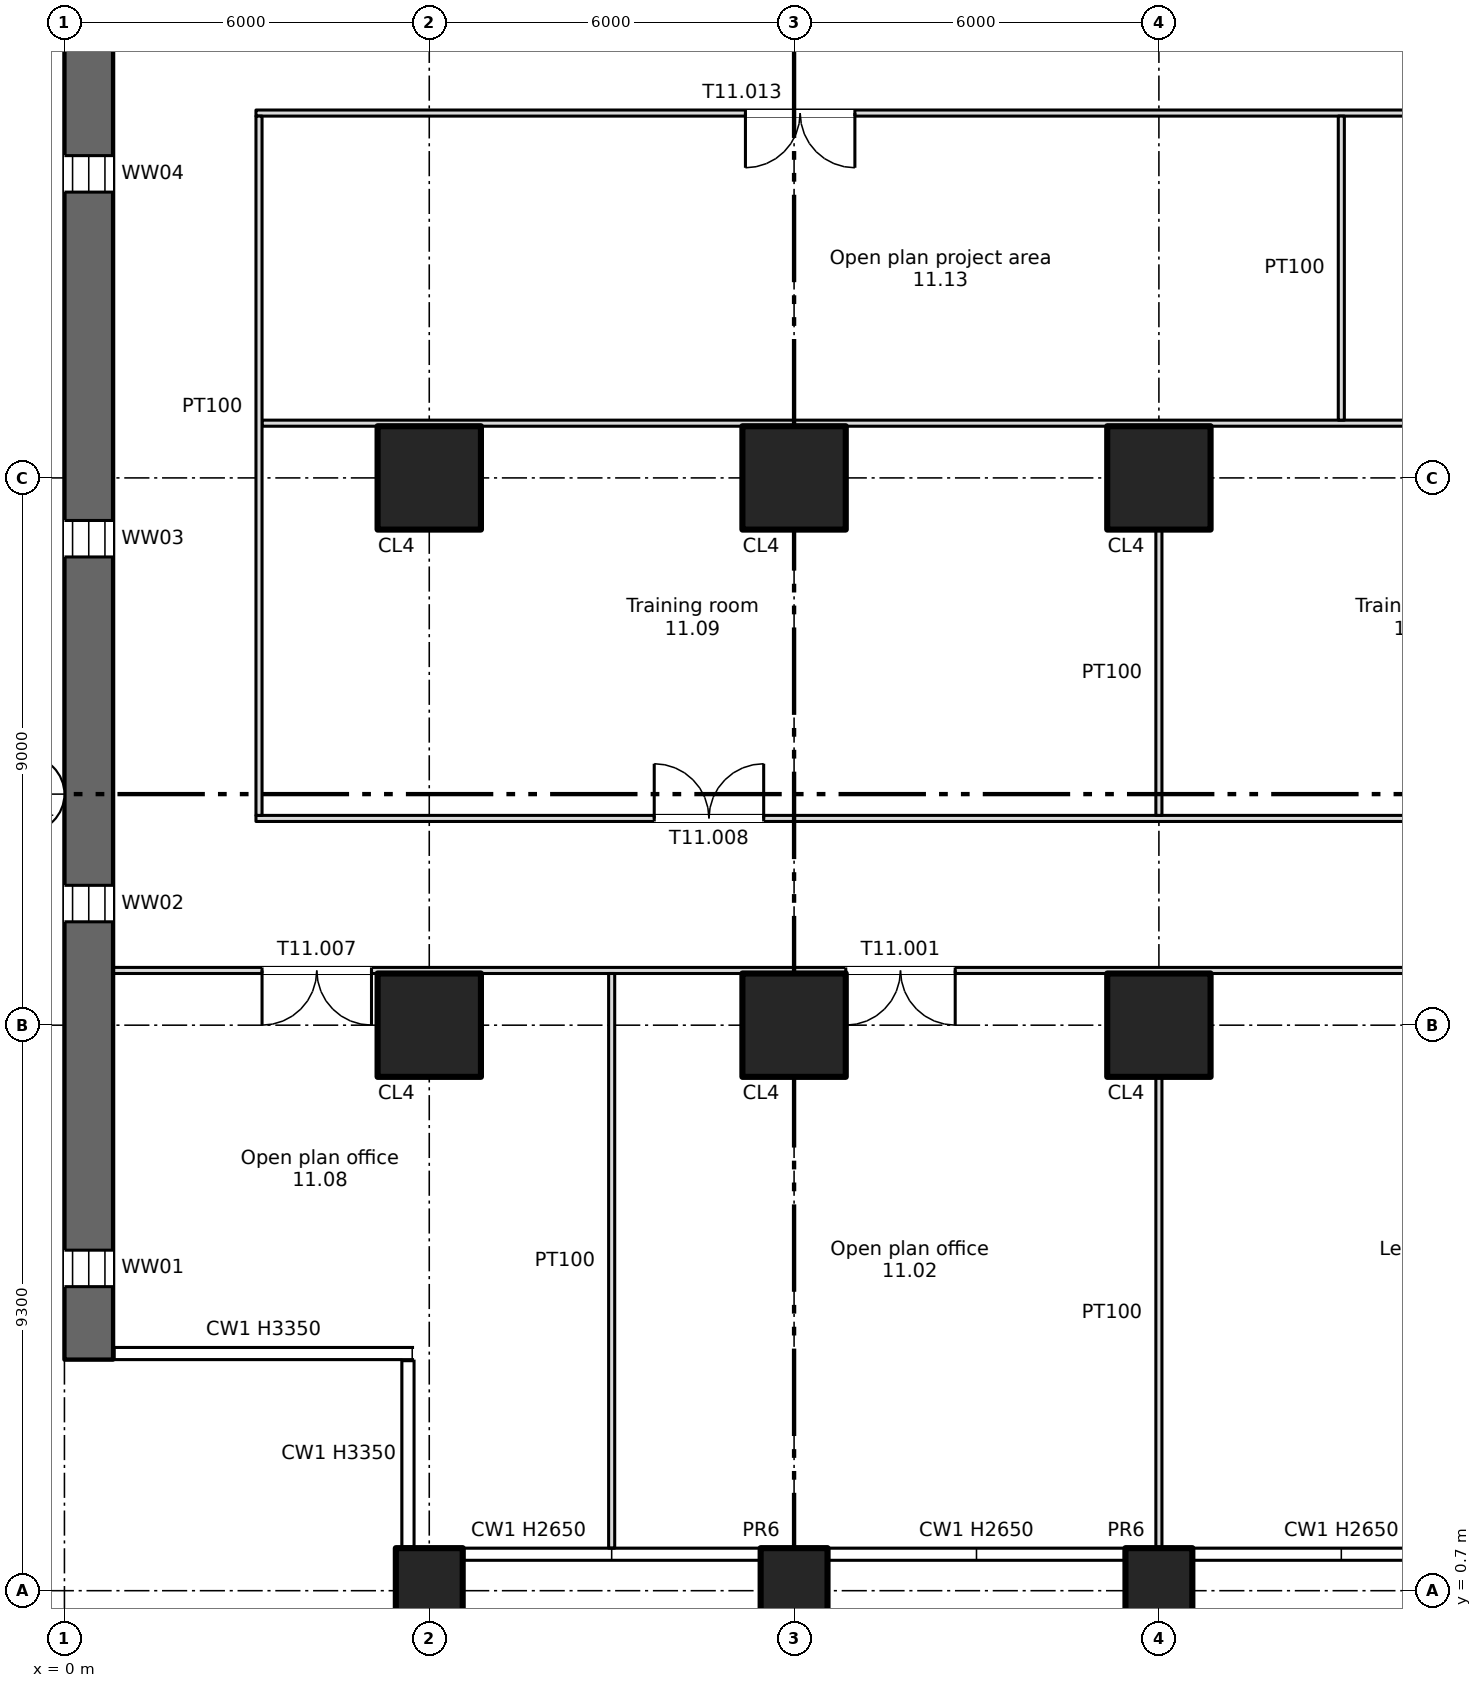
"""IFC4 building model, lengths in metres.
Left out: names, types, materials, properties, quantities, classifications, styles, units other than length and angle.
Written with IfcOpenShell. Run it as: python <this file> out.ifc"""

import sys

from ifc_helpers import new_model, si_unit, direction, frame, frame_2d, origin, origin_2d, place, context, subcontext, project, spatial, rectangle, extrude, element, fill, save


model = new_model("IFC4")
c1 = context("Model", 3, precision=1e-05, world=origin(), true_north=direction((0.0, 1.0)))
c2 = subcontext(c1, "Body", "Model", "MODEL_VIEW")
j1 = project(units=[si_unit("LENGTHUNIT", "METRE"), si_unit("PLANEANGLEUNIT", "RADIAN")], contexts=[c1])
p1 = place(None, origin())
s1 = spatial("IfcSite", under=j1, at=p1, CompositionType="ELEMENT")
p2 = place(p1, origin())
s2 = spatial("IfcBuilding", under=s1, at=p2, CompositionType="ELEMENT")
p3 = place(p2, frame((0.0, 0.0, 52.5)))
s3 = spatial("IfcBuildingStorey", under=s2, at=p3, CompositionType="ELEMENT", Elevation=52.5)
for number, where, z_axis, x_axis in (
    (1, (6.0, 0.7, -0.4), (0.0, 0.0, 1.0), (1.0, 0.0, 0.0)),
    (2, (12.0, 0.7, -0.4), (0.0, 0.0, 1.0), (1.0, 0.0, 0.0)),
    (3, (18.0, 0.7, -0.4), (0.0, 0.0, 1.0), (1.0, 0.0, 0.0)),
):
    element("IfcColumn", number, at=place(p3, frame(where, z_axis=z_axis, x_axis=x_axis)), inside=s3, PredefinedType="COLUMN", context=c2, shape_type="SweptSolid", body=[
        extrude(rectangle(XDim=1.1, YDim=1.4, at=origin_2d()), origin(), (0.0, 0.0, 1.0), 3.75),
    ])
for number, where, z_axis, x_axis in (
    (4, (6.0, 10.0, 0.0), (0.0, 0.0, 1.0), (1.0, 0.0, 0.0)),
    (5, (6.0, 19.0, 0.0), (0.0, 0.0, 1.0), (1.0, 0.0, 0.0)),
    (6, (12.0, 10.0, 0.0), (0.0, 0.0, 1.0), (1.0, 0.0, 0.0)),
    (7, (12.0, 19.0, 0.0), (0.0, 0.0, 1.0), (1.0, 0.0, 0.0)),
    (8, (18.0, 10.0, 0.0), (0.0, 0.0, 1.0), (1.0, 0.0, 0.0)),
    (9, (18.0, 19.0, 0.0), (0.0, 0.0, 1.0), (1.0, 0.0, 0.0)),
):
    element("IfcColumn", number, at=place(p3, frame(where, z_axis=z_axis, x_axis=x_axis)), inside=s3, PredefinedType="COLUMN", context=c2, shape_type="SweptSolid", body=[
        extrude(rectangle(XDim=1.7, YDim=1.7, at=origin_2d()), origin(), (0.0, 0.0, 1.0), 3.35),
    ])
p4 = place(p3, frame((0.4, 4.5, 0.0), z_axis=(0.0, 0.0, 1.0), x_axis=(0.0, 1.0, 0.0)))
e10 = element("IfcWall", 10, at=p4, inside=s3, PredefinedType="SHEAR", context=c2, shape_type="SweptSolid", body=[
    extrude(rectangle(XDim=37.0, YDim=0.8, at=frame_2d((18.5, 0.0))), origin(), (0.0, 0.0, 1.0), 3.35),
])
p5 = place(p4, frame((1.2, 0.0, 0.6)))
e11 = element("IfcOpeningElement", 11, at=p5, cuts=e10, PredefinedType="OPENING", context=c2, shape_type="SweptSolid", body=[
    extrude(rectangle(XDim=0.6, YDim=2.4, at=frame_2d((0.3, 1.2))), frame((0.0, 0.41, 0.0), z_axis=(0.0, -1.0, 0.0), x_axis=(1.0, 0.0, 0.0)), (0.0, 0.0, 1.0), 0.82),
])
p6 = place(p4, frame((7.2, 0.0, 0.6)))
e12 = element("IfcOpeningElement", 12, at=p6, cuts=e10, PredefinedType="OPENING", context=c2, shape_type="SweptSolid", body=[
    extrude(rectangle(XDim=0.6, YDim=2.4, at=frame_2d((0.3, 1.2))), frame((0.0, 0.41, 0.0), z_axis=(0.0, -1.0, 0.0), x_axis=(1.0, 0.0, 0.0)), (0.0, 0.0, 1.0), 0.82),
])
p7 = place(p4, frame((13.2, 0.0, 0.6)))
e13 = element("IfcOpeningElement", 13, at=p7, cuts=e10, PredefinedType="OPENING", context=c2, shape_type="SweptSolid", body=[
    extrude(rectangle(XDim=0.6, YDim=2.4, at=frame_2d((0.3, 1.2))), frame((0.0, 0.41, 0.0), z_axis=(0.0, -1.0, 0.0), x_axis=(1.0, 0.0, 0.0)), (0.0, 0.0, 1.0), 0.82),
])
p8 = place(p4, frame((19.2, 0.0, 0.6)))
e14 = element("IfcOpeningElement", 14, at=p8, cuts=e10, PredefinedType="OPENING", context=c2, shape_type="SweptSolid", body=[
    extrude(rectangle(XDim=0.6, YDim=2.4, at=frame_2d((0.3, 1.2))), frame((0.0, 0.41, 0.0), z_axis=(0.0, -1.0, 0.0), x_axis=(1.0, 0.0, 0.0)), (0.0, 0.0, 1.0), 0.82),
])
p9 = place(p4, frame((25.2, 0.0, 0.6)))
e15 = element("IfcOpeningElement", 15, at=p9, cuts=e10, PredefinedType="OPENING", context=c2, shape_type="SweptSolid", body=[
    extrude(rectangle(XDim=0.6, YDim=2.4, at=frame_2d((0.3, 1.2))), frame((0.0, 0.41, 0.0), z_axis=(0.0, -1.0, 0.0), x_axis=(1.0, 0.0, 0.0)), (0.0, 0.0, 1.0), 0.82),
])
p10 = place(p4, frame((31.2, 0.0, 0.6)))
e16 = element("IfcOpeningElement", 16, at=p10, cuts=e10, PredefinedType="OPENING", context=c2, shape_type="SweptSolid", body=[
    extrude(rectangle(XDim=0.6, YDim=2.4, at=frame_2d((0.3, 1.2))), frame((0.0, 0.41, 0.0), z_axis=(0.0, -1.0, 0.0), x_axis=(1.0, 0.0, 0.0)), (0.0, 0.0, 1.0), 0.82),
])
p11 = place(p3, frame((0.8, 10.9, 0.0), z_axis=(0.0, 0.0, 1.0), x_axis=(1.0, 0.0, 0.0)))
e17 = element("IfcWall", 17, at=p11, inside=s3, PredefinedType="PARTITIONING", context=c2, shape_type="SweptSolid", body=[
    extrude(rectangle(XDim=76.4, YDim=0.1, at=frame_2d((38.2, 0.0))), origin(), (0.0, 0.0, 1.0), 3.35),
])
p12 = place(p11, frame((12.05, 0.0, 0.0)))
e18 = element("IfcOpeningElement", 18, at=p12, cuts=e17, PredefinedType="OPENING", context=c2, shape_type="SweptSolid", body=[
    extrude(rectangle(XDim=1.8, YDim=2.1, at=frame_2d((0.9, 1.05))), frame((0.0, 0.06, 0.0), z_axis=(0.0, -1.0, 0.0), x_axis=(1.0, 0.0, 0.0)), (0.0, 0.0, 1.0), 0.12),
])
p13 = place(p11, frame((56.55, 0.0, 0.0)))
e19 = element("IfcOpeningElement", 19, at=p13, cuts=e17, PredefinedType="OPENING", context=c2, shape_type="SweptSolid", body=[
    extrude(rectangle(XDim=1.8, YDim=2.1, at=frame_2d((0.9, 1.05))), frame((0.0, 0.06, 0.0), z_axis=(0.0, -1.0, 0.0), x_axis=(1.0, 0.0, 0.0)), (0.0, 0.0, 1.0), 0.12),
])
p14 = place(p11, frame((24.05, 0.0, 0.0)))
e20 = element("IfcOpeningElement", 20, at=p14, cuts=e17, PredefinedType="OPENING", context=c2, shape_type="SweptSolid", body=[
    extrude(rectangle(XDim=1.8, YDim=2.1, at=frame_2d((0.9, 1.05))), frame((0.0, 0.06, 0.0), z_axis=(0.0, -1.0, 0.0), x_axis=(1.0, 0.0, 0.0)), (0.0, 0.0, 1.0), 0.12),
])
p15 = place(p11, frame((36.05, 0.0, 0.0)))
e21 = element("IfcOpeningElement", 21, at=p15, cuts=e17, PredefinedType="OPENING", context=c2, shape_type="SweptSolid", body=[
    extrude(rectangle(XDim=1.8, YDim=2.1, at=frame_2d((0.9, 1.05))), frame((0.0, 0.06, 0.0), z_axis=(0.0, -1.0, 0.0), x_axis=(1.0, 0.0, 0.0)), (0.0, 0.0, 1.0), 0.12),
])
p16 = place(p11, frame((48.05, 0.0, 0.0)))
e22 = element("IfcOpeningElement", 22, at=p16, cuts=e17, PredefinedType="OPENING", context=c2, shape_type="SweptSolid", body=[
    extrude(rectangle(XDim=1.8, YDim=2.1, at=frame_2d((0.9, 1.05))), frame((0.0, 0.06, 0.0), z_axis=(0.0, -1.0, 0.0), x_axis=(1.0, 0.0, 0.0)), (0.0, 0.0, 1.0), 0.12),
])
p17 = place(p11, frame((68.4, 0.0, 0.0)))
e23 = element("IfcOpeningElement", 23, at=p17, cuts=e17, PredefinedType="OPENING", context=c2, shape_type="SweptSolid", body=[
    extrude(rectangle(XDim=1.8, YDim=2.1, at=frame_2d((0.9, 1.05))), frame((0.0, 0.06, 0.0), z_axis=(0.0, -1.0, 0.0), x_axis=(1.0, 0.0, 0.0)), (0.0, 0.0, 1.0), 0.12),
])
p18 = place(p11, frame((2.45, 0.0, 0.0)))
e24 = element("IfcOpeningElement", 24, at=p18, cuts=e17, PredefinedType="OPENING", context=c2, shape_type="SweptSolid", body=[
    extrude(rectangle(XDim=1.8, YDim=2.1, at=frame_2d((0.9, 1.05))), frame((0.0, 0.06, 0.0), z_axis=(0.0, -1.0, 0.0), x_axis=(1.0, 0.0, 0.0)), (0.0, 0.0, 1.0), 0.12),
])
p19 = place(p3, frame((3.15, 13.4, 0.0), z_axis=(0.0, 0.0, 1.0), x_axis=(1.0, 0.0, 0.0)))
e25 = element("IfcWall", 25, at=p19, inside=s3, PredefinedType="PARTITIONING", context=c2, shape_type="SweptSolid", body=[
    extrude(rectangle(XDim=71.7, YDim=0.1, at=frame_2d((35.85, 0.0))), origin(), (0.0, 0.0, 1.0), 3.35),
])
p20 = place(p19, frame((6.55, 0.0, 0.0)))
e26 = element("IfcOpeningElement", 26, at=p20, cuts=e25, PredefinedType="OPENING", context=c2, shape_type="SweptSolid", body=[
    extrude(rectangle(XDim=1.8, YDim=2.1, at=frame_2d((0.9, 1.05))), frame((0.0, 0.06, 0.0), z_axis=(0.0, -1.0, 0.0), x_axis=(1.0, 0.0, 0.0)), (0.0, 0.0, 1.0), 0.12),
])
p21 = place(p19, frame((33.45, 0.0, 0.0)))
e27 = element("IfcOpeningElement", 27, at=p21, cuts=e25, PredefinedType="OPENING", context=c2, shape_type="SweptSolid", body=[
    extrude(rectangle(XDim=1.8, YDim=2.1, at=frame_2d((0.9, 1.05))), frame((0.0, 0.06, 0.0), z_axis=(0.0, -1.0, 0.0), x_axis=(1.0, 0.0, 0.0)), (0.0, 0.0, 1.0), 0.12),
])
p22 = place(p19, frame((48.7, 0.0, 0.0)))
e28 = element("IfcOpeningElement", 28, at=p22, cuts=e25, PredefinedType="OPENING", context=c2, shape_type="SweptSolid", body=[
    extrude(rectangle(XDim=1.2, YDim=2.1, at=frame_2d((0.6, 1.05))), frame((0.0, 0.06, 0.0), z_axis=(0.0, -1.0, 0.0), x_axis=(1.0, 0.0, 0.0)), (0.0, 0.0, 1.0), 0.12),
])
p23 = place(p19, frame((63.6, 0.0, 0.0)))
e29 = element("IfcOpeningElement", 29, at=p23, cuts=e25, PredefinedType="OPENING", context=c2, shape_type="SweptSolid", body=[
    extrude(rectangle(XDim=1.2, YDim=2.1, at=frame_2d((0.6, 1.05))), frame((0.0, 0.06, 0.0), z_axis=(0.0, -1.0, 0.0), x_axis=(1.0, 0.0, 0.0)), (0.0, 0.0, 1.0), 0.12),
])
p24 = place(p19, frame((19.95, 0.0, 0.0)))
e30 = element("IfcOpeningElement", 30, at=p24, cuts=e25, PredefinedType="OPENING", context=c2, shape_type="SweptSolid", body=[
    extrude(rectangle(XDim=1.8, YDim=2.1, at=frame_2d((0.9, 1.05))), frame((0.0, 0.06, 0.0), z_axis=(0.0, -1.0, 0.0), x_axis=(1.0, 0.0, 0.0)), (0.0, 0.0, 1.0), 0.12),
])
p25 = place(p3, frame((3.25, 19.9, 0.0), z_axis=(0.0, 0.0, 1.0), x_axis=(1.0, 0.0, 0.0)))
e31 = element("IfcWall", 31, at=p25, inside=s3, PredefinedType="PARTITIONING", context=c2, shape_type="SweptSolid", body=[
    extrude(rectangle(XDim=71.5, YDim=0.1, at=frame_2d((35.75, 0.0))), origin(), (0.0, 0.0, 1.0), 3.35),
])
p26 = place(p3, frame((3.15, 25.0, 0.0), z_axis=(0.0, 0.0, 1.0), x_axis=(1.0, 0.0, 0.0)))
e32 = element("IfcWall", 32, at=p26, inside=s3, PredefinedType="PARTITIONING", context=c2, shape_type="SweptSolid", body=[
    extrude(rectangle(XDim=71.7, YDim=0.1, at=frame_2d((35.85, 0.0))), origin(), (0.0, 0.0, 1.0), 3.35),
])
p27 = place(p26, frame((8.05, 0.0, 0.0)))
e33 = element("IfcOpeningElement", 33, at=p27, cuts=e32, PredefinedType="OPENING", context=c2, shape_type="SweptSolid", body=[
    extrude(rectangle(XDim=1.8, YDim=2.1, at=frame_2d((0.9, 1.05))), frame((0.0, 0.06, 0.0), z_axis=(0.0, -1.0, 0.0), x_axis=(1.0, 0.0, 0.0)), (0.0, 0.0, 1.0), 0.12),
])
p28 = place(p26, frame((61.85, 0.0, 0.0)))
e34 = element("IfcOpeningElement", 34, at=p28, cuts=e32, PredefinedType="OPENING", context=c2, shape_type="SweptSolid", body=[
    extrude(rectangle(XDim=1.8, YDim=2.1, at=frame_2d((0.9, 1.05))), frame((0.0, 0.06, 0.0), z_axis=(0.0, -1.0, 0.0), x_axis=(1.0, 0.0, 0.0)), (0.0, 0.0, 1.0), 0.12),
])
p29 = place(p26, frame((22.95, 0.0, 0.0)))
e35 = element("IfcOpeningElement", 35, at=p29, cuts=e32, PredefinedType="OPENING", context=c2, shape_type="SweptSolid", body=[
    extrude(rectangle(XDim=1.8, YDim=2.1, at=frame_2d((0.9, 1.05))), frame((0.0, 0.06, 0.0), z_axis=(0.0, -1.0, 0.0), x_axis=(1.0, 0.0, 0.0)), (0.0, 0.0, 1.0), 0.12),
])
p30 = place(p26, frame((35.35, 0.0, 0.0)))
e36 = element("IfcOpeningElement", 36, at=p30, cuts=e32, PredefinedType="OPENING", context=c2, shape_type="SweptSolid", body=[
    extrude(rectangle(XDim=1.0, YDim=2.1, at=frame_2d((0.5, 1.05))), frame((0.0, 0.06, 0.0), z_axis=(0.0, -1.0, 0.0), x_axis=(1.0, 0.0, 0.0)), (0.0, 0.0, 1.0), 0.12),
])
p31 = place(p26, frame((46.95, 0.0, 0.0)))
e37 = element("IfcOpeningElement", 37, at=p31, cuts=e32, PredefinedType="OPENING", context=c2, shape_type="SweptSolid", body=[
    extrude(rectangle(XDim=1.8, YDim=2.1, at=frame_2d((0.9, 1.05))), frame((0.0, 0.06, 0.0), z_axis=(0.0, -1.0, 0.0), x_axis=(1.0, 0.0, 0.0)), (0.0, 0.0, 1.0), 0.12),
])
p32 = place(p3, frame((3.2, 13.45, 0.0), z_axis=(0.0, 0.0, 1.0), x_axis=(0.0, 1.0, 0.0)))
e38 = element("IfcWall", 38, at=p32, inside=s3, PredefinedType="PARTITIONING", context=c2, shape_type="SweptSolid", body=[
    extrude(rectangle(XDim=11.5, YDim=0.1, at=frame_2d((5.75, 0.0))), origin(), (0.0, 0.0, 1.0), 3.35),
])
p33 = place(p3, frame((9.0, 1.4, 0.0), z_axis=(0.0, 0.0, 1.0), x_axis=(0.0, 1.0, 0.0)))
e39 = element("IfcWall", 39, at=p33, inside=s3, PredefinedType="PARTITIONING", context=c2, shape_type="SweptSolid", body=[
    extrude(rectangle(XDim=9.45, YDim=0.1, at=frame_2d((4.725, 0.0))), origin(), (0.0, 0.0, 1.0), 3.35),
])
p34 = place(p3, frame((18.0, 1.4, 0.0), z_axis=(0.0, 0.0, 1.0), x_axis=(0.0, 1.0, 0.0)))
e40 = element("IfcWall", 40, at=p34, inside=s3, PredefinedType="PARTITIONING", context=c2, shape_type="SweptSolid", body=[
    extrude(rectangle(XDim=7.75, YDim=0.1, at=frame_2d((3.875, 0.0))), origin(), (0.0, 0.0, 1.0), 3.35),
])
p35 = place(p3, frame((18.0, 13.45, 0.0), z_axis=(0.0, 0.0, 1.0), x_axis=(0.0, 1.0, 0.0)))
e41 = element("IfcWall", 41, at=p35, inside=s3, PredefinedType="PARTITIONING", context=c2, shape_type="SweptSolid", body=[
    extrude(rectangle(XDim=4.7, YDim=0.1, at=frame_2d((2.35, 0.0))), origin(), (0.0, 0.0, 1.0), 3.35),
])
p36 = place(p3, frame((21.0, 19.95, 0.0), z_axis=(0.0, 0.0, 1.0), x_axis=(0.0, 1.0, 0.0)))
e42 = element("IfcWall", 42, at=p36, inside=s3, PredefinedType="PARTITIONING", context=c2, shape_type="SweptSolid", body=[
    extrude(rectangle(XDim=5.0, YDim=0.1, at=frame_2d((2.5, 0.0))), origin(), (0.0, 0.0, 1.0), 3.35),
])
p37 = place(p5, origin())
e43 = element("IfcWindow", 43, at=p37, inside=s3, PartitioningType="SINGLE_PANEL", PredefinedType="WINDOW", context=c2, shape_type="SweptSolid", body=[
    extrude(rectangle(XDim=0.6, YDim=2.4, at=frame_2d((0.3, 1.2))), frame((0.0, 0.03, 0.0), z_axis=(0.0, -1.0, 0.0), x_axis=(1.0, 0.0, 0.0)), (0.0, 0.0, 1.0), 0.06),
])
fill(e11, e43)
p38 = place(p6, origin())
e44 = element("IfcWindow", 44, at=p38, inside=s3, PartitioningType="SINGLE_PANEL", PredefinedType="WINDOW", context=c2, shape_type="SweptSolid", body=[
    extrude(rectangle(XDim=0.6, YDim=2.4, at=frame_2d((0.3, 1.2))), frame((0.0, 0.03, 0.0), z_axis=(0.0, -1.0, 0.0), x_axis=(1.0, 0.0, 0.0)), (0.0, 0.0, 1.0), 0.06),
])
fill(e12, e44)
p39 = place(p7, origin())
e45 = element("IfcWindow", 45, at=p39, inside=s3, PartitioningType="SINGLE_PANEL", PredefinedType="WINDOW", context=c2, shape_type="SweptSolid", body=[
    extrude(rectangle(XDim=0.6, YDim=2.4, at=frame_2d((0.3, 1.2))), frame((0.0, 0.03, 0.0), z_axis=(0.0, -1.0, 0.0), x_axis=(1.0, 0.0, 0.0)), (0.0, 0.0, 1.0), 0.06),
])
fill(e13, e45)
p40 = place(p8, origin())
e46 = element("IfcWindow", 46, at=p40, inside=s3, PartitioningType="SINGLE_PANEL", PredefinedType="WINDOW", context=c2, shape_type="SweptSolid", body=[
    extrude(rectangle(XDim=0.6, YDim=2.4, at=frame_2d((0.3, 1.2))), frame((0.0, 0.03, 0.0), z_axis=(0.0, -1.0, 0.0), x_axis=(1.0, 0.0, 0.0)), (0.0, 0.0, 1.0), 0.06),
])
fill(e14, e46)
p41 = place(p12, origin())
e47 = element("IfcDoor", 47, at=p41, inside=s3, OperationType="DOUBLE_DOOR_SINGLE_SWING", PredefinedType="DOOR", context=c2, shape_type="SweptSolid", body=[
    extrude(rectangle(XDim=1.8, YDim=2.1, at=frame_2d((0.9, 1.05))), frame((0.0, 0.025, 0.0), z_axis=(0.0, -1.0, 0.0), x_axis=(1.0, 0.0, 0.0)), (0.0, 0.0, 1.0), 0.05),
])
fill(e18, e47)
p42 = place(p18, origin())
e48 = element("IfcDoor", 48, at=p42, inside=s3, OperationType="DOUBLE_DOOR_SINGLE_SWING", PredefinedType="DOOR", context=c2, shape_type="SweptSolid", body=[
    extrude(rectangle(XDim=1.8, YDim=2.1, at=frame_2d((0.9, 1.05))), frame((0.0, 0.025, 0.0), z_axis=(0.0, -1.0, 0.0), x_axis=(1.0, 0.0, 0.0)), (0.0, 0.0, 1.0), 0.05),
])
fill(e24, e48)
p43 = place(p20, origin())
e49 = element("IfcDoor", 49, at=p43, inside=s3, OperationType="DOUBLE_DOOR_SINGLE_SWING", PredefinedType="DOOR", context=c2, shape_type="SweptSolid", body=[
    extrude(rectangle(XDim=1.8, YDim=2.1, at=frame_2d((0.9, 1.05))), frame((0.0, 0.025, 0.0), z_axis=(0.0, -1.0, 0.0), x_axis=(1.0, 0.0, 0.0)), (0.0, 0.0, 1.0), 0.05),
])
fill(e26, e49)
p44 = place(p27, origin())
e50 = element("IfcDoor", 50, at=p44, inside=s3, OperationType="DOUBLE_DOOR_SINGLE_SWING", PredefinedType="DOOR", context=c2, shape_type="SweptSolid", body=[
    extrude(rectangle(XDim=1.8, YDim=2.1, at=frame_2d((0.9, 1.05))), frame((0.0, 0.025, 0.0), z_axis=(0.0, -1.0, 0.0), x_axis=(1.0, 0.0, 0.0)), (0.0, 0.0, 1.0), 0.05),
])
fill(e33, e50)
save(model, sys.argv[1])
